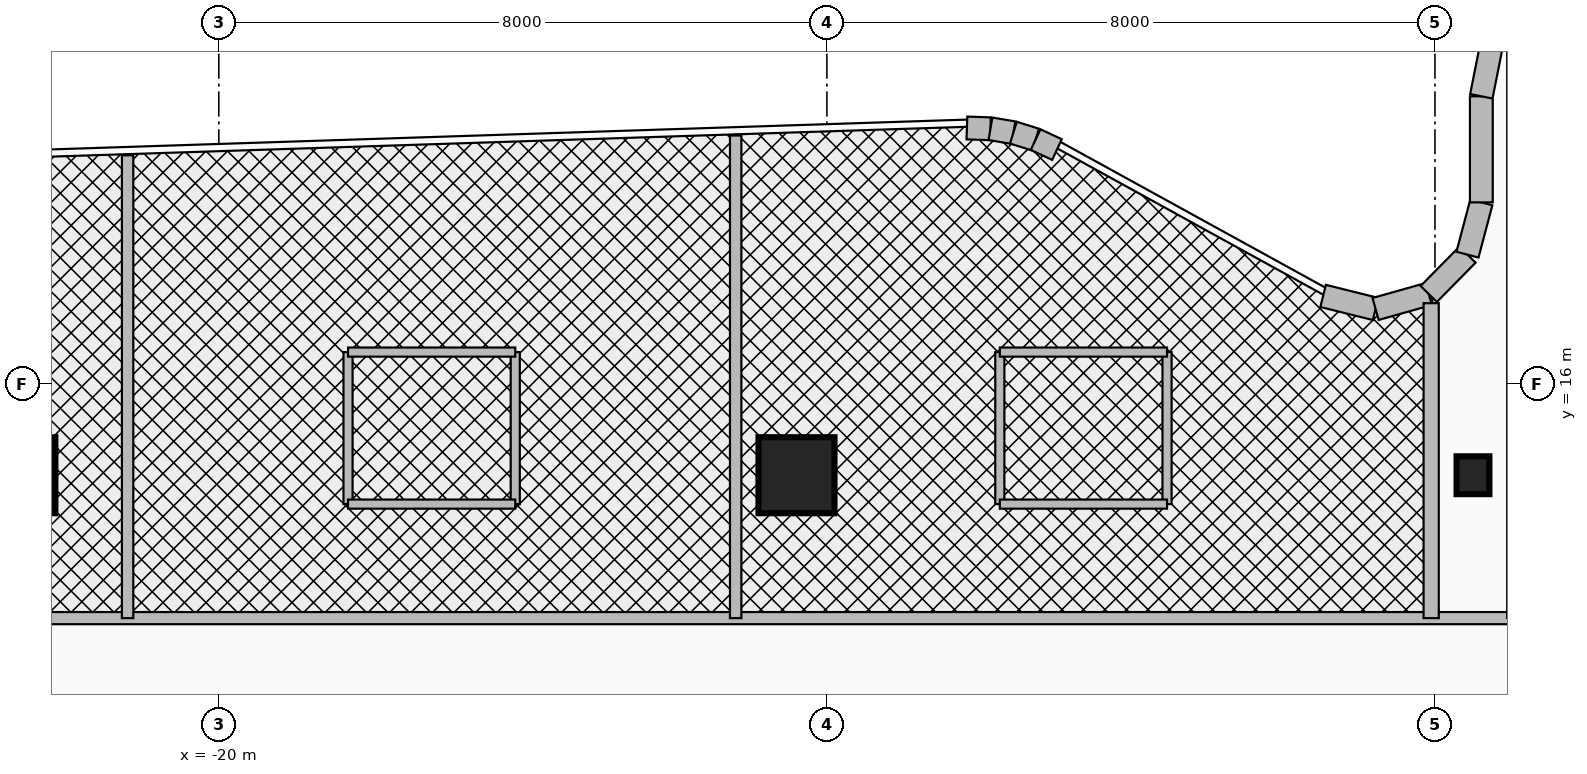
"""IFC4 building model, lengths in metres.
Left out: names, types, materials, properties, quantities, classifications, styles, units other than length and angle.
Written with IfcOpenShell. Run it as: python <this file> out.ifc"""

import sys

from ifc_helpers import new_model, si_unit, direction, frame, frame_2d, origin, origin_2d, place, context, subcontext, project, spatial, rectangle, i_section, extrude, source, transform, mapped, element, fill, save


model = new_model("IFC4")
c1 = context("Model", 3, precision=1e-05, world=origin(), true_north=direction((0.0, 1.0)))
c2 = subcontext(c1, "Body", "Model", "MODEL_VIEW")
j1 = project(units=[si_unit("LENGTHUNIT", "METRE"), si_unit("PLANEANGLEUNIT", "RADIAN")], contexts=[c1])
p1 = place(None, origin())
s1 = spatial("IfcSite", under=j1, at=p1, CompositionType="ELEMENT")
p2 = place(p1, origin())
s2 = spatial("IfcBuilding", under=s1, at=p2, CompositionType="ELEMENT")
p3 = place(p2, frame((0.0, 0.0, 172.3)))
s3 = spatial("IfcBuildingStorey", under=s2, at=p3, CompositionType="ELEMENT", Elevation=172.3)
m1 = source(origin(), c2, "Body", "SweptSolid", [
    extrude(rectangle(XDim=1.0, YDim=1.0, at=origin_2d()), origin(), (0.0, 0.0, 1.0), 4.25),
])
for number, where, z_axis, x_axis in (
    (1, (-22.65, 14.8, 0.0), (0.0, 0.0, 1.0), (1.0, 0.0, 0.0)),
    (2, (-12.4, 14.8, 0.0), (0.0, 0.0, 1.0), (1.0, 0.0, 0.0)),
):
    element("IfcColumn", number, at=place(p3, frame(where, z_axis=z_axis, x_axis=x_axis)), inside=s3, PredefinedType="COLUMN", context=c2, shape_type="MappedRepresentation", body=[
        mapped(m1, transform((0.0, 0.0, 0.0), x_axis=(1.0, 0.0, 0.0), y_axis=(0.0, 1.0, 0.0), z_axis=(0.0, 0.0, 1.0), scale=1.0)),
    ])
m2 = source(origin(), c2, "Body", "SweptSolid", [
    extrude(i_section(OverallWidth=0.432, OverallDepth=0.498, WebThickness=0.056, FlangeThickness=0.089, at=origin_2d()), origin(), (0.0, 0.0, 1.0), 4.25),
])
p4 = place(p3, frame((-3.5, 14.8, 0.0), z_axis=(0.0, 0.0, 1.0), x_axis=(1.0, 0.0, 0.0)))
e3 = element("IfcColumn", 3, at=p4, inside=s3, PredefinedType="COLUMN", context=c2, shape_type="MappedRepresentation", body=[
    mapped(m2, transform((0.0, 0.0, 0.0), x_axis=(1.0, 0.0, 0.0), y_axis=(0.0, 1.0, 0.0), z_axis=(0.0, 0.0, 1.0), scale=1.0)),
])
p5 = place(p3, frame((-10.158, 19.368, 0.0), z_axis=(0.0, 0.0, 1.0), x_axis=(0.999425494718, -0.03389218949, 0.0)))
e4 = element("IfcWall", 4, at=p5, inside=s3, PredefinedType="SOLIDWALL", context=c2, shape_type="SweptSolid", body=[
    extrude(rectangle(XDim=0.31, YDim=0.3, at=frame_2d((0.155, 0.0))), origin(), (0.0, 0.0, 1.0), 3.93),
])
for number, where, z_axis, x_axis in (
    (5, (-9.848, 19.358, 0.0), (0.0, 0.0, 1.0), (0.986, -0.167, 0.0)),
    (6, (-9.546, 19.307, 0.0), (0.0, 0.0, 1.0), (0.955, -0.297, 0.0)),
):
    element("IfcWall", number, at=place(p3, frame(where, z_axis=z_axis, x_axis=x_axis)), inside=s3, PredefinedType="SOLIDWALL", context=c2, shape_type="SweptSolid", body=[
        extrude(rectangle(XDim=0.306, YDim=0.3, at=frame_2d((0.153, 0.0))), origin(), (0.0, 0.0, 1.0), 3.93),
    ])
p6 = place(p3, frame((-9.254, 19.216, 0.0), z_axis=(0.0, 0.0, 1.0), x_axis=(0.906524902388, -0.42215234377, 0.0)))
e7 = element("IfcWall", 7, at=p6, inside=s3, PredefinedType="SOLIDWALL", context=c2, shape_type="SweptSolid", body=[
    extrude(rectangle(XDim=0.31, YDim=0.3, at=frame_2d((0.155, 0.0))), origin(), (0.0, 0.0, 1.0), 3.93),
])
p7 = place(p3, frame((-5.472, 17.159, 0.0), z_axis=(0.0, 0.0, 1.0), x_axis=(0.970564820059, -0.240840050789, 0.0)))
e8 = element("IfcWall", 8, at=p7, inside=s3, PredefinedType="SOLIDWALL", context=c2, shape_type="SweptSolid", body=[
    extrude(rectangle(XDim=0.712, YDim=0.3, at=frame_2d((0.356, 0.0))), origin(), (0.0, 0.0, 1.0), 3.93),
])
p8 = place(p3, frame((-4.781, 16.987, 0.0), z_axis=(0.0, 0.0, 1.0), x_axis=(0.962494705656, 0.271300463662, 0.0)))
e9 = element("IfcWall", 9, at=p8, inside=s3, PredefinedType="SOLIDWALL", context=c2, shape_type="SweptSolid", body=[
    extrude(rectangle(XDim=0.726, YDim=0.3, at=frame_2d((0.363, 0.0))), origin(), (0.0, 0.0, 1.0), 3.93),
])
p9 = place(p3, frame((-4.082, 17.184, 0.0), z_axis=(0.0, 0.0, 1.0), x_axis=(0.701538604215, 0.712631452293, 0.0)))
e10 = element("IfcWall", 10, at=p9, inside=s3, PredefinedType="SOLIDWALL", context=c2, shape_type="SweptSolid", body=[
    extrude(rectangle(XDim=0.726, YDim=0.3, at=frame_2d((0.363, 0.0))), origin(), (0.0, 0.0, 1.0), 2.915),
])
p10 = place(p3, frame((-3.573, 17.702, 0.0), z_axis=(0.0, 0.0, 1.0), x_axis=(0.256637481794, 0.966507735581, 0.0)))
e11 = element("IfcWall", 11, at=p10, inside=s3, PredefinedType="SOLIDWALL", context=c2, shape_type="SweptSolid", body=[
    extrude(rectangle(XDim=0.712, YDim=0.3, at=frame_2d((0.356, 0.0))), origin(), (0.0, 0.0, 1.0), 2.915),
])
p11 = place(p3, frame((-3.39, 18.39, 0.0), z_axis=(0.0, 0.0, 1.0), x_axis=(0.0, 1.0, 0.0)))
e12 = element("IfcWall", 12, at=p11, inside=s3, PredefinedType="SOLIDWALL", context=c2, shape_type="SweptSolid", body=[
    extrude(rectangle(XDim=1.396, YDim=0.3, at=frame_2d((0.698, 0.0))), origin(), (0.0, 0.0, 1.0), 2.915),
])
p12 = place(p3, frame((-3.39, 19.785, 0.0), z_axis=(0.0, 0.0, 1.0), x_axis=(0.195094354541, 0.980784478276, 0.0)))
e13 = element("IfcWall", 13, at=p12, inside=s3, PredefinedType="SOLIDWALL", context=c2, shape_type="SweptSolid", body=[
    extrude(rectangle(XDim=0.827, YDim=0.3, at=frame_2d((0.414, 0.0))), origin(), (0.0, 0.0, 1.0), 2.915),
])
p13 = place(p3, frame((-28.25, 12.92, 0.0), z_axis=(0.0, 0.0, 1.0), x_axis=(1.0, 0.0, 0.0)))
e14 = element("IfcWall", 14, at=p13, inside=s3, PredefinedType="PARTITIONING", context=c2, shape_type="SweptSolid", body=[
    extrude(rectangle(XDim=36.75, YDim=0.16, at=frame_2d((18.375, 0.0))), origin(), (0.0, 0.0, 1.0), 2.915),
])
p14 = place(p13, frame((3.05, 0.0, 0.0)))
e15 = element("IfcOpeningElement", 15, at=p14, cuts=e14, PredefinedType="OPENING", context=c2, shape_type="SweptSolid", body=[
    extrude(rectangle(XDim=0.95, YDim=2.15, at=frame_2d((0.475, 1.075))), frame((0.0, 0.095, 0.0), z_axis=(0.0, -1.0, 0.0), x_axis=(1.0, 0.0, 0.0)), (0.0, 0.0, 1.0), 0.19),
])
p15 = place(p13, frame((10.575, 0.0, 0.0)))
e16 = element("IfcOpeningElement", 16, at=p15, cuts=e14, PredefinedType="OPENING", context=c2, shape_type="SweptSolid", body=[
    extrude(rectangle(XDim=0.95, YDim=2.15, at=frame_2d((0.475, 1.075))), frame((0.0, 0.095, 0.0), z_axis=(0.0, -1.0, 0.0), x_axis=(1.0, 0.0, 0.0)), (0.0, 0.0, 1.0), 0.19),
])
p16 = place(p13, frame((19.15, 0.0, 0.0)))
e17 = element("IfcOpeningElement", 17, at=p16, cuts=e14, PredefinedType="OPENING", context=c2, shape_type="SweptSolid", body=[
    extrude(rectangle(XDim=0.95, YDim=2.15, at=frame_2d((0.475, 1.075))), frame((0.0, 0.095, 0.0), z_axis=(0.0, -1.0, 0.0), x_axis=(1.0, 0.0, 0.0)), (0.0, 0.0, 1.0), 0.19),
])
p17 = place(p13, frame((27.55, 0.0, 0.0)))
e18 = element("IfcOpeningElement", 18, at=p17, cuts=e14, PredefinedType="OPENING", context=c2, shape_type="SweptSolid", body=[
    extrude(rectangle(XDim=0.95, YDim=2.15, at=frame_2d((0.475, 1.075))), frame((0.0, 0.095, 0.0), z_axis=(0.0, -1.0, 0.0), x_axis=(1.0, 0.0, 0.0)), (0.0, 0.0, 1.0), 0.19),
])
p18 = place(p13, frame((33.981, 0.0, 0.0)))
e19 = element("IfcOpeningElement", 19, at=p18, cuts=e14, PredefinedType="OPENING", context=c2, shape_type="SweptSolid", body=[
    extrude(rectangle(XDim=0.95, YDim=2.15, at=frame_2d((0.475, 1.075))), frame((0.0, 0.095, 0.0), z_axis=(0.0, -1.0, 0.0), x_axis=(1.0, 0.0, 0.0)), (0.0, 0.0, 1.0), 0.19),
])
p19 = place(p3, frame((-4.05, 12.92, 0.0), z_axis=(0.0, 0.0, 1.0), x_axis=(0.0, 1.0, 0.0)))
e20 = element("IfcWall", 20, at=p19, inside=s3, PredefinedType="PARTITIONING", context=c2, shape_type="SweptSolid", body=[
    extrude(rectangle(XDim=4.144, YDim=0.2, at=frame_2d((2.072, 0.0))), origin(), (0.0, 0.0, 1.0), 2.715),
])
p20 = place(p3, frame((-21.2, 12.92, 0.0), z_axis=(0.0, 0.0, 1.0), x_axis=(0.0, 1.0, 0.0)))
e21 = element("IfcWall", 21, at=p20, inside=s3, PredefinedType="PARTITIONING", context=c2, shape_type="SweptSolid", body=[
    extrude(rectangle(XDim=6.089, YDim=0.15, at=frame_2d((3.044, 0.0))), origin(), (0.0, 0.0, 1.0), 2.965),
])
p21 = place(p3, frame((-13.2, 12.92, 0.0), z_axis=(0.0, 0.0, 1.0), x_axis=(0.0, 1.0, 0.0)))
e22 = element("IfcWall", 22, at=p21, inside=s3, PredefinedType="PARTITIONING", context=c2, shape_type="SweptSolid", body=[
    extrude(rectangle(XDim=6.35, YDim=0.15, at=frame_2d((3.175, 0.0))), origin(), (0.0, 0.0, 1.0), 2.965),
])
for number, where, z_axis, x_axis in (
    (23, (-18.3, 14.42, 0.0), (0.0, 0.0, 1.0), (0.0, 1.0, 0.0)),
    (24, (-16.1, 14.42, 0.0), (0.0, 0.0, 1.0), (0.0, 1.0, 0.0)),
):
    element("IfcWall", number, at=place(p3, frame(where, z_axis=z_axis, x_axis=x_axis)), inside=s3, PredefinedType="PARTITIONING", context=c2, shape_type="SweptSolid", body=[
        extrude(rectangle(XDim=2.0, YDim=0.12, at=frame_2d((1.0, 0.0))), origin(), (0.0, 0.0, 1.0), 2.965),
    ])
p22 = place(p3, frame((-18.3, 16.42, 0.0), z_axis=(0.0, 0.0, 1.0), x_axis=(1.0, 0.0, 0.0)))
e25 = element("IfcWall", 25, at=p22, inside=s3, PredefinedType="PARTITIONING", context=c2, shape_type="SweptSolid", body=[
    extrude(rectangle(XDim=2.2, YDim=0.12, at=frame_2d((1.1, 0.0))), origin(), (0.0, 0.0, 1.0), 3.93),
])
p23 = place(p3, frame((-18.3, 14.42, 0.0), z_axis=(0.0, 0.0, 1.0), x_axis=(1.0, 0.0, 0.0)))
e26 = element("IfcWall", 26, at=p23, inside=s3, PredefinedType="PARTITIONING", context=c2, shape_type="SweptSolid", body=[
    extrude(rectangle(XDim=2.2, YDim=0.12, at=frame_2d((1.1, 0.0))), origin(), (0.0, 0.0, 1.0), 3.93),
])
p24 = place(p23, frame((0.675, 0.0, 0.0)))
e27 = element("IfcOpeningElement", 27, at=p24, cuts=e26, PredefinedType="OPENING", context=c2, shape_type="SweptSolid", body=[
    extrude(rectangle(XDim=0.85, YDim=2.1, at=frame_2d((0.425, 1.05))), frame((0.0, 0.075, 0.0), z_axis=(0.0, -1.0, 0.0), x_axis=(1.0, 0.0, 0.0)), (0.0, 0.0, 1.0), 0.15),
])
for number, where, z_axis, x_axis in (
    (28, (-9.725, 14.42, 0.0), (0.0, 0.0, 1.0), (0.0, 1.0, 0.0)),
    (29, (-7.525, 14.42, 0.0), (0.0, 0.0, 1.0), (0.0, 1.0, 0.0)),
):
    element("IfcWall", number, at=place(p3, frame(where, z_axis=z_axis, x_axis=x_axis)), inside=s3, PredefinedType="PARTITIONING", context=c2, shape_type="SweptSolid", body=[
        extrude(rectangle(XDim=2.0, YDim=0.12, at=frame_2d((1.0, 0.0))), origin(), (0.0, 0.0, 1.0), 2.715),
    ])
p25 = place(p3, frame((-9.725, 16.42, 0.0), z_axis=(0.0, 0.0, 1.0), x_axis=(1.0, 0.0, 0.0)))
e30 = element("IfcWall", 30, at=p25, inside=s3, PredefinedType="PARTITIONING", context=c2, shape_type="SweptSolid", body=[
    extrude(rectangle(XDim=2.2, YDim=0.12, at=frame_2d((1.1, 0.0))), origin(), (0.0, 0.0, 1.0), 3.93),
])
p26 = place(p3, frame((-9.725, 14.42, 0.0), z_axis=(0.0, 0.0, 1.0), x_axis=(1.0, 0.0, 0.0)))
e31 = element("IfcWall", 31, at=p26, inside=s3, PredefinedType="PARTITIONING", context=c2, shape_type="SweptSolid", body=[
    extrude(rectangle(XDim=2.2, YDim=0.12, at=frame_2d((1.1, 0.0))), origin(), (0.0, 0.0, 1.0), 2.715),
])
p27 = place(p26, frame((0.675, 0.0, 0.0)))
e32 = element("IfcOpeningElement", 32, at=p27, cuts=e31, PredefinedType="OPENING", context=c2, shape_type="SweptSolid", body=[
    extrude(rectangle(XDim=0.85, YDim=2.1, at=frame_2d((0.425, 1.05))), frame((0.0, 0.075, 0.0), z_axis=(0.0, -1.0, 0.0), x_axis=(1.0, 0.0, 0.0)), (0.0, 0.0, 1.0), 0.15),
])
p28 = place(p15, origin())
e33 = element("IfcDoor", 33, at=p28, inside=s3, OperationType="SINGLE_SWING_RIGHT", PredefinedType="DOOR", context=c2, shape_type="SweptSolid", body=[
    extrude(rectangle(XDim=0.95, YDim=2.15, at=frame_2d((0.475, 1.075))), frame((0.0, 0.025, 0.0), z_axis=(0.0, -1.0, 0.0), x_axis=(1.0, 0.0, 0.0)), (0.0, 0.0, 1.0), 0.05),
])
fill(e16, e33)
p29 = place(p24, origin())
e34 = element("IfcDoor", 34, at=p29, inside=s3, OperationType="SINGLE_SWING_LEFT", PredefinedType="DOOR", context=c2, shape_type="SweptSolid", body=[
    extrude(rectangle(XDim=0.85, YDim=2.1, at=frame_2d((0.425, 1.05))), frame((0.0, 0.025, 0.0), z_axis=(0.0, -1.0, 0.0), x_axis=(1.0, 0.0, 0.0)), (0.0, 0.0, 1.0), 0.05),
])
fill(e27, e34)
p30 = place(p16, origin())
e35 = element("IfcDoor", 35, at=p30, inside=s3, OperationType="SINGLE_SWING_RIGHT", PredefinedType="DOOR", context=c2, shape_type="SweptSolid", body=[
    extrude(rectangle(XDim=0.95, YDim=2.15, at=frame_2d((0.475, 1.075))), frame((0.0, 0.025, 0.0), z_axis=(0.0, -1.0, 0.0), x_axis=(1.0, 0.0, 0.0)), (0.0, 0.0, 1.0), 0.05),
])
fill(e17, e35)
p31 = place(p27, origin())
e36 = element("IfcDoor", 36, at=p31, inside=s3, OperationType="SINGLE_SWING_LEFT", PredefinedType="DOOR", context=c2, shape_type="SweptSolid", body=[
    extrude(rectangle(XDim=0.85, YDim=2.1, at=frame_2d((0.425, 1.05))), frame((0.0, 0.025, 0.0), z_axis=(0.0, -1.0, 0.0), x_axis=(1.0, 0.0, 0.0)), (0.0, 0.0, 1.0), 0.05),
])
fill(e32, e36)
save(model, sys.argv[1])
